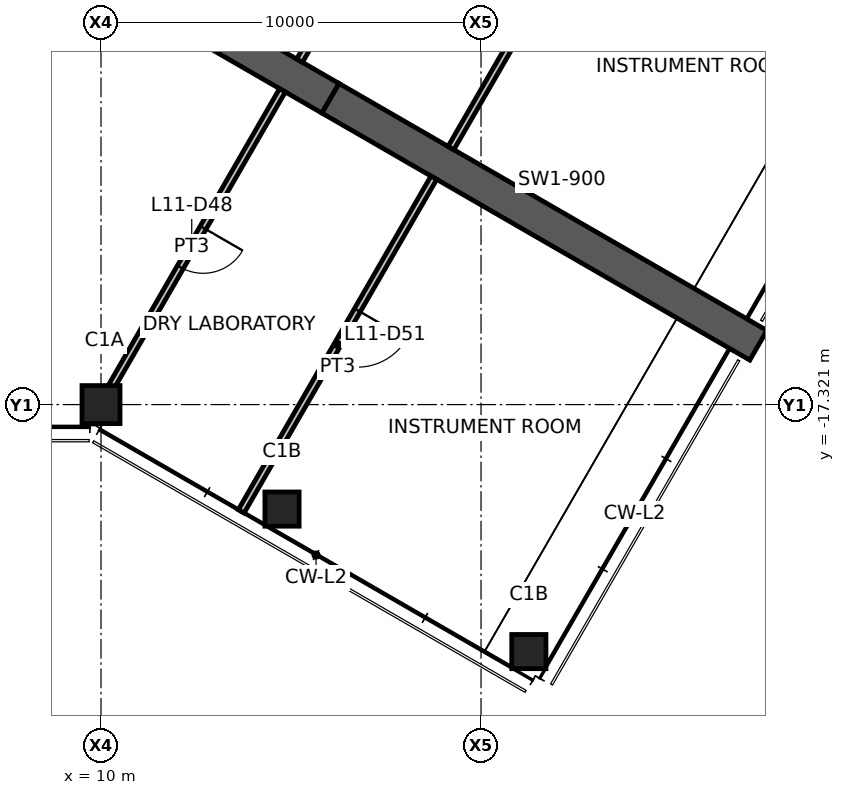
"""IFC4 building model, lengths in metres.
Left out: names, types, materials, properties, quantities, classifications, styles, units other than length and angle.
Written with IfcOpenShell. Run it as: python <this file> out.ifc"""

import sys

from ifc_helpers import new_model, si_unit, direction, frame, frame_2d, origin, origin_2d, place, context, subcontext, project, spatial, polyline, rectangle, hollow_rectangle, outline, extrude, element, fill, save


model = new_model("IFC4")
c1 = context("Model", 3, precision=1e-05, world=origin(), true_north=direction((0.0, 1.0)))
c2 = subcontext(c1, "Body", "Model", "MODEL_VIEW")
j1 = project(units=[si_unit("LENGTHUNIT", "METRE"), si_unit("PLANEANGLEUNIT", "RADIAN")], contexts=[c1])
p1 = place(None, origin())
s1 = spatial("IfcSite", under=j1, at=p1, CompositionType="ELEMENT")
p2 = place(p1, origin())
s2 = spatial("IfcBuilding", under=s1, at=p2, CompositionType="ELEMENT")
p3 = place(p2, frame((0.0, 0.0, 43.6)))
s3 = spatial("IfcBuildingStorey", under=s2, at=p3, CompositionType="ELEMENT", Elevation=43.6)
p4 = place(p3, frame((10.0, -17.321, 0.0), z_axis=(0.0, 0.0, 1.0), x_axis=(1.0, 0.0, 0.0)))
e1 = element("IfcColumn", 1, at=p4, inside=s3, PredefinedType="COLUMN", context=c2, shape_type="SweptSolid", body=[
    extrude(hollow_rectangle(XDim=1.0, YDim=1.0, WallThickness=0.06, at=origin_2d()), origin(), (0.0, 0.0, 1.0), 4.2),
])
for number, where, z_axis, x_axis in (
    (2, (14.763, -20.071, 0.0), (0.0, 0.0, 1.0), (1.0, 0.0, 0.0)),
    (3, (21.258, -23.821, 0.0), (0.0, 0.0, 1.0), (1.0, 0.0, 0.0)),
):
    element("IfcColumn", number, at=place(p3, frame(where, z_axis=z_axis, x_axis=x_axis)), inside=s3, PredefinedType="COLUMN", context=c2, shape_type="SweptSolid", body=[
        extrude(hollow_rectangle(XDim=0.9, YDim=0.9, WallThickness=0.05, at=origin_2d()), origin(), (0.0, 0.0, 1.0), 4.2),
    ])
p5 = place(p3, frame((5.961, -10.325, 0.0), z_axis=(0.0, 0.0, 1.0), x_axis=(0.500004296715, 0.866022923061, 0.0)))
e4 = element("IfcWall", 4, at=p5, inside=s3, PredefinedType="SHEAR", context=c2, shape_type="SweptSolid", body=[
    extrude(outline(polyline([(-0.346, -0.6), (3.208, -0.6), (4.009, -0.6), (12.269, -0.6), (11.576, 0.6), (4.009, 0.6), (3.208, 0.6), (0.346, 0.6), (-0.346, -0.6)])), origin(), (0.0, 0.0, 1.0), 4.2),
])
p6 = place(p5, frame((3.208, 0.0, 0.0)))
e5 = element("IfcOpeningElement", 5, at=p6, cuts=e4, PredefinedType="OPENING", context=c2, shape_type="SweptSolid", body=[
    extrude(rectangle(XDim=0.8, YDim=2.1, at=frame_2d((0.4, 1.05))), frame((0.0, 0.61, 0.0), z_axis=(0.0, -1.0, 0.0), x_axis=(1.0, 0.0, 0.0)), (0.0, 0.0, 1.0), 1.22),
])
p7 = place(p3, frame((9.461, -5.462, 0.0), z_axis=(0.0, 0.0, 1.0), x_axis=(0.866019116917, -0.500010889016, 0.0)))
e6 = element("IfcWall", 6, at=p7, inside=s3, PredefinedType="SHEAR", context=c2, shape_type="SweptSolid", body=[
    extrude(rectangle(XDim=7.595, YDim=0.9, at=frame_2d((3.798, 0.0))), origin(), (0.0, 0.0, 1.0), 4.2),
])
p8 = place(p7, frame((0.8, 0.0, 0.0)))
e7 = element("IfcOpeningElement", 7, at=p8, cuts=e6, PredefinedType="OPENING", context=c2, shape_type="SweptSolid", body=[
    extrude(rectangle(XDim=1.0, YDim=2.1, at=frame_2d((0.5, 1.05))), frame((0.0, 0.46, 0.0), z_axis=(0.0, -1.0, 0.0), x_axis=(1.0, 0.0, 0.0)), (0.0, 0.0, 1.0), 0.92),
])
p9 = place(p3, frame((16.039, -9.26, 0.0), z_axis=(0.0, 0.0, 1.0), x_axis=(0.866024837091, -0.50000098154, 0.0)))
e8 = element("IfcWall", 8, at=p9, inside=s3, PredefinedType="SHEAR", context=c2, shape_type="SweptSolid", body=[
    extrude(rectangle(XDim=13.0, YDim=0.9, at=frame_2d((6.5, 0.0))), origin(), (0.0, 0.0, 1.0), 4.2),
])
p10 = place(p3, frame((15.225, -8.271, 0.0), z_axis=(0.0, 0.0, 1.0), x_axis=(0.499993908199, 0.866028920859, 0.0)))
e9 = element("IfcWall", 9, at=p10, inside=s3, PredefinedType="PARTITIONING", context=c2, shape_type="SweptSolid", body=[
    extrude(rectangle(XDim=9.55, YDim=0.175, at=frame_2d((4.775, 0.0))), origin(), (0.0, 0.0, 1.0), 3.238),
])
p11 = place(p10, frame((4.175, 0.0, 0.0)))
e10 = element("IfcOpeningElement", 10, at=p11, cuts=e9, PredefinedType="OPENING", context=c2, shape_type="SweptSolid", body=[
    extrude(rectangle(XDim=1.2, YDim=2.1, at=frame_2d((0.6, 1.05))), frame((0.0, 0.098, 0.0), z_axis=(0.0, -1.0, 0.0), x_axis=(1.0, 0.0, 0.0)), (0.0, 0.0, 1.0), 0.195),
])
p12 = place(p3, frame((19.209, -10.571, 0.0), z_axis=(0.0, 0.0, 1.0), x_axis=(0.500005203629, 0.866022399447, 0.0)))
e11 = element("IfcWall", 11, at=p12, inside=s3, PredefinedType="PARTITIONING", context=c2, shape_type="SweptSolid", body=[
    extrude(rectangle(XDim=10.14, YDim=0.175, at=frame_2d((5.07, 0.0))), origin(), (0.0, 0.0, 1.0), 4.03),
])
p13 = place(p12, frame((4.025, 0.0, 0.0)))
e12 = element("IfcOpeningElement", 12, at=p13, cuts=e11, PredefinedType="OPENING", context=c2, shape_type="SweptSolid", body=[
    extrude(rectangle(XDim=1.5, YDim=2.1, at=frame_2d((0.75, 1.05))), frame((0.0, 0.098, 0.0), z_axis=(0.0, -1.0, 0.0), x_axis=(1.0, 0.0, 0.0)), (0.0, 0.0, 1.0), 0.195),
])
p14 = place(p3, frame((14.775, -9.05, 0.0), z_axis=(0.0, 0.0, 1.0), x_axis=(-0.499993908199, -0.866028920859, 0.0)))
e13 = element("IfcWall", 13, at=p14, inside=s3, PredefinedType="PARTITIONING", context=c2, shape_type="SweptSolid", body=[
    extrude(rectangle(XDim=9.55, YDim=0.175, at=frame_2d((4.775, 0.0))), origin(), (0.0, 0.0, 1.0), 3.238),
])
p15 = place(p14, frame((4.175, 0.0, 0.0)))
e14 = element("IfcOpeningElement", 14, at=p15, cuts=e13, PredefinedType="OPENING", context=c2, shape_type="SweptSolid", body=[
    extrude(rectangle(XDim=1.2, YDim=2.1, at=frame_2d((0.6, 1.05))), frame((0.0, 0.098, 0.0), z_axis=(0.0, -1.0, 0.0), x_axis=(1.0, 0.0, 0.0)), (0.0, 0.0, 1.0), 0.195),
])
p16 = place(p3, frame((18.759, -11.35, 0.0), z_axis=(0.0, 0.0, 1.0), x_axis=(-0.500005203629, -0.866022399447, 0.0)))
e15 = element("IfcWall", 15, at=p16, inside=s3, PredefinedType="PARTITIONING", context=c2, shape_type="SweptSolid", body=[
    extrude(rectangle(XDim=10.14, YDim=0.175, at=frame_2d((5.07, 0.0))), origin(), (0.0, 0.0, 1.0), 4.03),
])
p17 = place(p16, frame((4.025, 0.0, 0.0)))
e16 = element("IfcOpeningElement", 16, at=p17, cuts=e15, PredefinedType="OPENING", context=c2, shape_type="SweptSolid", body=[
    extrude(rectangle(XDim=1.5, YDim=2.1, at=frame_2d((0.75, 1.05))), frame((0.0, 0.098, 0.0), z_axis=(0.0, -1.0, 0.0), x_axis=(1.0, 0.0, 0.0)), (0.0, 0.0, 1.0), 0.195),
])
p18 = place(p15, origin())
e17 = element("IfcDoor", 17, at=p18, inside=s3, OperationType="DOUBLE_DOOR_SINGLE_SWING", PredefinedType="DOOR", context=c2, shape_type="SweptSolid", body=[
    extrude(rectangle(XDim=1.2, YDim=2.1, at=frame_2d((0.6, 1.05))), frame((0.0, 0.025, 0.0), z_axis=(0.0, -1.0, 0.0), x_axis=(1.0, 0.0, 0.0)), (0.0, 0.0, 1.0), 0.05),
])
fill(e14, e17)
p19 = place(p17, origin())
e18 = element("IfcDoor", 18, at=p19, inside=s3, OperationType="DOUBLE_DOOR_SINGLE_SWING", PredefinedType="DOOR", context=c2, shape_type="SweptSolid", body=[
    extrude(rectangle(XDim=1.5, YDim=2.1, at=frame_2d((0.75, 1.05))), frame((0.0, 0.025, 0.0), z_axis=(0.0, -1.0, 0.0), x_axis=(1.0, 0.0, 0.0)), (0.0, 0.0, 1.0), 0.05),
])
fill(e16, e18)
save(model, sys.argv[1])
